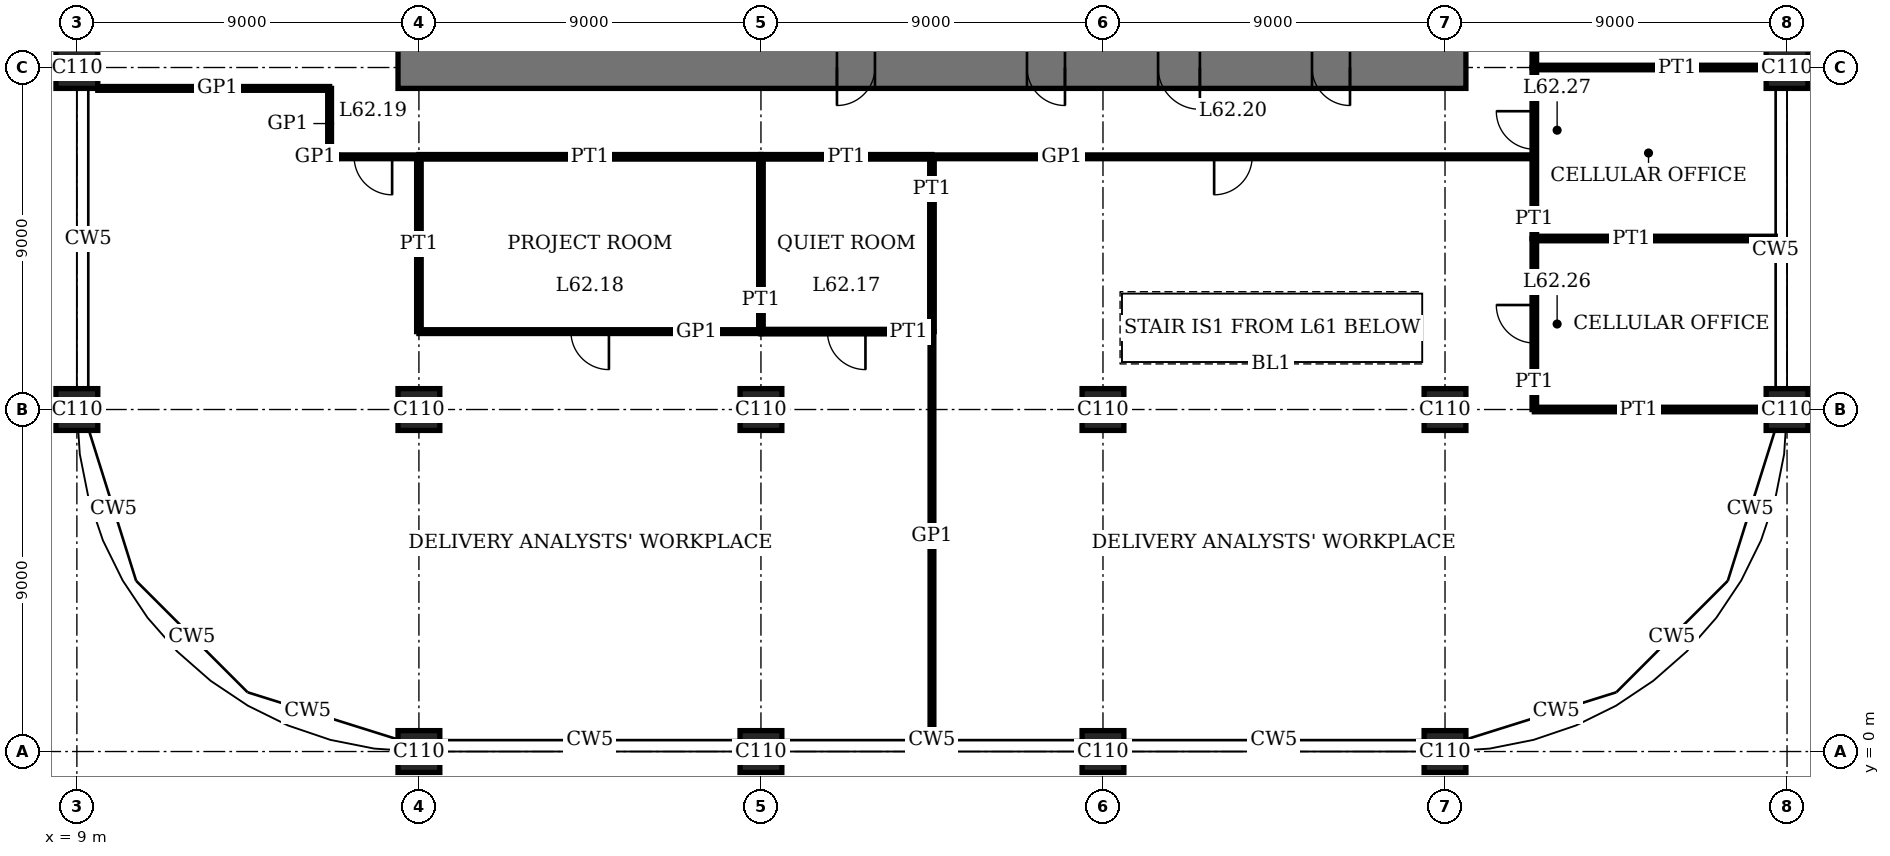
"""IFC4 building model, lengths in metres.
Left out: names, types, materials, properties, quantities, classifications, styles, units other than length and angle.
Written with IfcOpenShell. Run it as: python <this file> out.ifc"""

import sys

from ifc_helpers import new_model, si_unit, direction, frame, frame_2d, origin, origin_2d, place, context, subcontext, project, spatial, rectangle, extrude, element, fill, save


model = new_model("IFC4")
c1 = context("Model", 3, precision=1e-05, world=origin(), true_north=direction((0.0, 1.0)))
c2 = subcontext(c1, "Body", "Model", "MODEL_VIEW")
j1 = project(units=[si_unit("LENGTHUNIT", "METRE"), si_unit("PLANEANGLEUNIT", "RADIAN")], contexts=[c1])
p1 = place(None, origin())
s1 = spatial("IfcSite", under=j1, at=p1, CompositionType="ELEMENT")
p2 = place(p1, origin())
s2 = spatial("IfcBuilding", under=s1, at=p2, CompositionType="ELEMENT")
p3 = place(p2, frame((0.0, 0.0, 255.4)))
s3 = spatial("IfcBuildingStorey", under=s2, at=p3, CompositionType="ELEMENT", Elevation=255.4)
for number, where, z_axis, x_axis in (
    (1, (9.0, 9.0, 0.0), (0.0, 0.0, 1.0), (1.0, 0.0, 0.0)),
    (2, (9.0, 18.0, 0.0), (0.0, 0.0, 1.0), (1.0, 0.0, 0.0)),
    (3, (18.0, 0.0, 0.0), (0.0, 0.0, 1.0), (1.0, 0.0, 0.0)),
    (4, (18.0, 9.0, 0.0), (0.0, 0.0, 1.0), (1.0, 0.0, 0.0)),
    (5, (27.0, 0.0, 0.0), (0.0, 0.0, 1.0), (1.0, 0.0, 0.0)),
    (6, (27.0, 9.0, 0.0), (0.0, 0.0, 1.0), (1.0, 0.0, 0.0)),
    (7, (36.0, 0.0, 0.0), (0.0, 0.0, 1.0), (1.0, 0.0, 0.0)),
    (8, (36.0, 9.0, 0.0), (0.0, 0.0, 1.0), (1.0, 0.0, 0.0)),
    (9, (45.0, 0.0, 0.0), (0.0, 0.0, 1.0), (1.0, 0.0, 0.0)),
    (10, (45.0, 9.0, 0.0), (0.0, 0.0, 1.0), (1.0, 0.0, 0.0)),
    (11, (54.0, 9.0, 0.0), (0.0, 0.0, 1.0), (1.0, 0.0, 0.0)),
    (12, (54.0, 18.0, 0.0), (0.0, 0.0, 1.0), (1.0, 0.0, 0.0)),
):
    element("IfcColumn", number, at=place(p3, frame(where, z_axis=z_axis, x_axis=x_axis)), inside=s3, PredefinedType="COLUMN", context=c2, shape_type="SweptSolid", body=[
        extrude(rectangle(XDim=1.1, YDim=1.1, at=origin_2d()), origin(), (0.0, 0.0, 1.0), 4.0),
    ])
p4 = place(p3, frame((17.45, 18.0, 0.0), z_axis=(0.0, 0.0, 1.0), x_axis=(1.0, 0.0, 0.0)))
e13 = element("IfcWall", 13, at=p4, inside=s3, PredefinedType="SHEAR", context=c2, shape_type="SweptSolid", body=[
    extrude(rectangle(XDim=28.1, YDim=1.1, at=frame_2d((14.05, 0.0))), origin(), (0.0, 0.0, 1.0), 4.0),
])
p5 = place(p4, frame((11.55, 0.0, 0.0)))
e14 = element("IfcOpeningElement", 14, at=p5, cuts=e13, PredefinedType="OPENING", context=c2, shape_type="SweptSolid", body=[
    extrude(rectangle(XDim=1.0, YDim=2.4, at=frame_2d((0.5, 1.2))), frame((0.0, 0.56, 0.0), z_axis=(0.0, -1.0, 0.0), x_axis=(1.0, 0.0, 0.0)), (0.0, 0.0, 1.0), 1.12),
])
p6 = place(p4, frame((16.55, 0.0, 0.0)))
e15 = element("IfcOpeningElement", 15, at=p6, cuts=e13, PredefinedType="OPENING", context=c2, shape_type="SweptSolid", body=[
    extrude(rectangle(XDim=1.0, YDim=2.4, at=frame_2d((0.5, 1.2))), frame((0.0, 0.56, 0.0), z_axis=(0.0, -1.0, 0.0), x_axis=(1.0, 0.0, 0.0)), (0.0, 0.0, 1.0), 1.12),
])
p7 = place(p4, frame((20.0, 0.0, 0.0)))
e16 = element("IfcOpeningElement", 16, at=p7, cuts=e13, PredefinedType="OPENING", context=c2, shape_type="SweptSolid", body=[
    extrude(rectangle(XDim=1.1, YDim=2.4, at=frame_2d((0.55, 1.2))), frame((0.0, 0.56, 0.0), z_axis=(0.0, -1.0, 0.0), x_axis=(1.0, 0.0, 0.0)), (0.0, 0.0, 1.0), 1.12),
])
p8 = place(p4, frame((24.05, 0.0, 0.0)))
e17 = element("IfcOpeningElement", 17, at=p8, cuts=e13, PredefinedType="OPENING", context=c2, shape_type="SweptSolid", body=[
    extrude(rectangle(XDim=1.0, YDim=2.4, at=frame_2d((0.5, 1.2))), frame((0.0, 0.56, 0.0), z_axis=(0.0, -1.0, 0.0), x_axis=(1.0, 0.0, 0.0)), (0.0, 0.0, 1.0), 1.12),
])
p9 = place(p3, frame((47.35, 9.0, 0.0), z_axis=(0.0, 0.0, 1.0), x_axis=(1.0, 0.0, 0.0)))
e18 = element("IfcWall", 18, at=p9, inside=s3, PredefinedType="PARTITIONING", context=c2, shape_type="SweptSolid", body=[
    extrude(rectangle(XDim=6.1, YDim=0.12, at=frame_2d((3.05, 0.0))), origin(), (0.0, 0.0, 1.0), 3.05),
])
p10 = place(p3, frame((27.0, 11.05, 0.0), z_axis=(0.0, 0.0, 1.0), x_axis=(1.0, 0.0, 0.0)))
e19 = element("IfcWall", 19, at=p10, inside=s3, PredefinedType="PARTITIONING", context=c2, shape_type="SweptSolid", body=[
    extrude(rectangle(XDim=4.5, YDim=0.12, at=frame_2d((2.25, 0.0))), origin(), (0.0, 0.0, 1.0), 3.75),
])
p11 = place(p10, frame((1.75, 0.0, 0.0)))
e20 = element("IfcOpeningElement", 20, at=p11, cuts=e19, PredefinedType="OPENING", context=c2, shape_type="SweptSolid", body=[
    extrude(rectangle(XDim=1.0, YDim=2.4, at=frame_2d((0.5, 1.2))), frame((0.0, 0.07, 0.0), z_axis=(0.0, -1.0, 0.0), x_axis=(1.0, 0.0, 0.0)), (0.0, 0.0, 1.0), 0.14),
])
p12 = place(p3, frame((18.0, 11.05, 0.0), z_axis=(0.0, 0.0, 1.0), x_axis=(1.0, 0.0, 0.0)))
e21 = element("IfcWall", 21, at=p12, inside=s3, PredefinedType="PARTITIONING", context=c2, shape_type="SweptSolid", body=[
    extrude(rectangle(XDim=9.0, YDim=0.1, at=frame_2d((4.5, 0.0))), origin(), (0.0, 0.0, 1.0), 3.75),
])
p13 = place(p12, frame((4.0, 0.0, 0.0)))
e22 = element("IfcOpeningElement", 22, at=p13, cuts=e21, PredefinedType="OPENING", context=c2, shape_type="SweptSolid", body=[
    extrude(rectangle(XDim=1.0, YDim=2.4, at=frame_2d((0.5, 1.2))), frame((0.0, 0.06, 0.0), z_axis=(0.0, -1.0, 0.0), x_axis=(1.0, 0.0, 0.0)), (0.0, 0.0, 1.0), 0.12),
])
p14 = place(p3, frame((47.35, 13.5, 0.0), z_axis=(0.0, 0.0, 1.0), x_axis=(1.0, 0.0, 0.0)))
e23 = element("IfcWall", 23, at=p14, inside=s3, PredefinedType="PARTITIONING", context=c2, shape_type="SweptSolid", body=[
    extrude(rectangle(XDim=6.34, YDim=0.12, at=frame_2d((3.17, 0.0))), origin(), (0.0, 0.0, 1.0), 3.1),
])
p15 = place(p3, frame((18.0, 15.65, 0.0), z_axis=(0.0, 0.0, 1.0), x_axis=(1.0, 0.0, 0.0)))
e24 = element("IfcWall", 24, at=p15, inside=s3, PredefinedType="PARTITIONING", context=c2, shape_type="SweptSolid", body=[
    extrude(rectangle(XDim=9.0, YDim=0.12, at=frame_2d((4.5, 0.0))), origin(), (0.0, 0.0, 1.0), 3.75),
])
p16 = place(p3, frame((27.0, 15.65, 0.0), z_axis=(0.0, 0.0, 1.0), x_axis=(1.0, 0.0, 0.0)))
e25 = element("IfcWall", 25, at=p16, inside=s3, PredefinedType="PARTITIONING", context=c2, shape_type="SweptSolid", body=[
    extrude(rectangle(XDim=4.5, YDim=0.12, at=frame_2d((2.25, 0.0))), origin(), (0.0, 0.0, 1.0), 3.75),
])
p17 = place(p3, frame((15.6, 15.65, 0.0), z_axis=(0.0, 0.0, 1.0), x_axis=(1.0, 0.0, 0.0)))
e26 = element("IfcWall", 26, at=p17, inside=s3, PredefinedType="PARTITIONING", context=c2, shape_type="SweptSolid", body=[
    extrude(rectangle(XDim=2.39, YDim=0.1, at=frame_2d((1.195, 0.0))), origin(), (0.0, 0.0, 1.0), 3.75),
])
p18 = place(p17, frame((0.695, 0.0, 0.0)))
e27 = element("IfcOpeningElement", 27, at=p18, cuts=e26, PredefinedType="OPENING", context=c2, shape_type="SweptSolid", body=[
    extrude(rectangle(XDim=1.0, YDim=2.4, at=frame_2d((0.5, 1.2))), frame((0.0, 0.06, 0.0), z_axis=(0.0, -1.0, 0.0), x_axis=(1.0, 0.0, 0.0)), (0.0, 0.0, 1.0), 0.12),
])
p19 = place(p3, frame((31.51, 15.65, 0.0), z_axis=(0.0, 0.0, 1.0), x_axis=(1.0, 0.0, 0.0)))
e28 = element("IfcWall", 28, at=p19, inside=s3, PredefinedType="PARTITIONING", context=c2, shape_type="SweptSolid", body=[
    extrude(rectangle(XDim=15.83, YDim=0.1, at=frame_2d((7.915, 0.0))), origin(), (0.0, 0.0, 1.0), 3.75),
])
p20 = place(p19, frame((7.415, 0.0, 0.0)))
e29 = element("IfcOpeningElement", 29, at=p20, cuts=e28, PredefinedType="OPENING", context=c2, shape_type="SweptSolid", body=[
    extrude(rectangle(XDim=1.0, YDim=2.4, at=frame_2d((0.5, 1.2))), frame((0.0, 0.06, 0.0), z_axis=(0.0, -1.0, 0.0), x_axis=(1.0, 0.0, 0.0)), (0.0, 0.0, 1.0), 0.12),
])
p21 = place(p3, frame((9.55, 17.45, 0.0), z_axis=(0.0, 0.0, 1.0), x_axis=(1.0, 0.0, 0.0)))
e30 = element("IfcWall", 30, at=p21, inside=s3, PredefinedType="PARTITIONING", context=c2, shape_type="SweptSolid", body=[
    extrude(rectangle(XDim=6.1, YDim=0.1, at=frame_2d((3.05, 0.0))), origin(), (0.0, 0.0, 1.0), 3.75),
])
p22 = place(p3, frame((47.35, 18.0, 0.0), z_axis=(0.0, 0.0, 1.0), x_axis=(1.0, 0.0, 0.0)))
e31 = element("IfcWall", 31, at=p22, inside=s3, PredefinedType="PARTITIONING", context=c2, shape_type="SweptSolid", body=[
    extrude(rectangle(XDim=6.1, YDim=0.12, at=frame_2d((3.05, 0.0))), origin(), (0.0, 0.0, 1.0), 3.05),
])
p23 = place(p3, frame((15.65, 15.6, 0.0), z_axis=(0.0, 0.0, 1.0), x_axis=(0.0, 1.0, 0.0)))
e32 = element("IfcWall", 32, at=p23, inside=s3, PredefinedType="PARTITIONING", context=c2, shape_type="SweptSolid", body=[
    extrude(rectangle(XDim=1.85, YDim=0.1, at=frame_2d((0.925, 0.0))), origin(), (0.0, 0.0, 1.0), 3.75),
])
for number, where, z_axis, x_axis in (
    (33, (18.0, 11.05, 0.0), (0.0, 0.0, 1.0), (0.0, 1.0, 0.0)),
    (34, (27.0, 11.05, 0.0), (0.0, 0.0, 1.0), (0.0, 1.0, 0.0)),
):
    element("IfcWall", number, at=place(p3, frame(where, z_axis=z_axis, x_axis=x_axis)), inside=s3, PredefinedType="PARTITIONING", context=c2, shape_type="SweptSolid", body=[
        extrude(rectangle(XDim=4.6, YDim=0.12, at=frame_2d((2.3, 0.0))), origin(), (0.0, 0.0, 1.0), 3.05),
    ])
p24 = place(p3, frame((31.5, 11.05, 0.0), z_axis=(0.0, 0.0, 1.0), x_axis=(0.0, 1.0, 0.0)))
e35 = element("IfcWall", 35, at=p24, inside=s3, PredefinedType="PARTITIONING", context=c2, shape_type="SweptSolid", body=[
    extrude(rectangle(XDim=4.6, YDim=0.12, at=frame_2d((2.3, 0.0))), origin(), (0.0, 0.0, 1.0), 3.75),
])
p25 = place(p3, frame((31.5, 0.31, 0.0), z_axis=(0.0, 0.0, 1.0), x_axis=(0.0, 1.0, 0.0)))
e36 = element("IfcWall", 36, at=p25, inside=s3, PredefinedType="PARTITIONING", context=c2, shape_type="SweptSolid", body=[
    extrude(rectangle(XDim=10.74, YDim=0.1, at=frame_2d((5.37, 0.0))), origin(), (0.0, 0.0, 1.0), 3.75),
])
p26 = place(p3, frame((47.35, 9.0, 0.0), z_axis=(0.0, 0.0, 1.0), x_axis=(0.0, 1.0, 0.0)))
e37 = element("IfcWall", 37, at=p26, inside=s3, PredefinedType="PARTITIONING", context=c2, shape_type="SweptSolid", body=[
    extrude(rectangle(XDim=4.5, YDim=0.12, at=frame_2d((2.25, 0.0))), origin(), (0.0, 0.0, 1.0), 3.75),
])
p27 = place(p26, frame((1.75, 0.0, 0.0)))
e38 = element("IfcOpeningElement", 38, at=p27, cuts=e37, PredefinedType="OPENING", context=c2, shape_type="SweptSolid", body=[
    extrude(rectangle(XDim=1.0, YDim=2.4, at=frame_2d((0.5, 1.2))), frame((0.0, 0.07, 0.0), z_axis=(0.0, -1.0, 0.0), x_axis=(1.0, 0.0, 0.0)), (0.0, 0.0, 1.0), 0.14),
])
p28 = place(p3, frame((47.35, 13.5, 0.0), z_axis=(0.0, 0.0, 1.0), x_axis=(0.0, 1.0, 0.0)))
e39 = element("IfcWall", 39, at=p28, inside=s3, PredefinedType="PARTITIONING", context=c2, shape_type="SweptSolid", body=[
    extrude(rectangle(XDim=4.5, YDim=0.12, at=frame_2d((2.25, 0.0))), origin(), (0.0, 0.0, 1.0), 3.75),
])
p29 = place(p28, frame((2.35, 0.0, 0.0)))
e40 = element("IfcOpeningElement", 40, at=p29, cuts=e39, PredefinedType="OPENING", context=c2, shape_type="SweptSolid", body=[
    extrude(rectangle(XDim=1.0, YDim=2.4, at=frame_2d((0.5, 1.2))), frame((0.0, 0.07, 0.0), z_axis=(0.0, -1.0, 0.0), x_axis=(1.0, 0.0, 0.0)), (0.0, 0.0, 1.0), 0.14),
])
p30 = place(p3, frame((47.35, 18.0, 0.0), z_axis=(0.0, 0.0, 1.0), x_axis=(0.0, 1.0, 0.0)))
e41 = element("IfcWall", 41, at=p30, inside=s3, PredefinedType="PARTITIONING", context=c2, shape_type="SweptSolid", body=[
    extrude(rectangle(XDim=4.5, YDim=0.12, at=frame_2d((2.25, 0.0))), origin(), (0.0, 0.0, 1.0), 3.75),
])
p31 = place(p30, frame((1.75, 0.0, 0.0)))
e42 = element("IfcOpeningElement", 42, at=p31, cuts=e41, PredefinedType="OPENING", context=c2, shape_type="SweptSolid", body=[
    extrude(rectangle(XDim=1.0, YDim=2.4, at=frame_2d((0.5, 1.2))), frame((0.0, 0.07, 0.0), z_axis=(0.0, -1.0, 0.0), x_axis=(1.0, 0.0, 0.0)), (0.0, 0.0, 1.0), 0.14),
])
p32 = place(p5, origin())
e43 = element("IfcDoor", 43, at=p32, inside=s3, OperationType="SINGLE_SWING_LEFT", PredefinedType="DOOR", context=c2, shape_type="SweptSolid", body=[
    extrude(rectangle(XDim=1.0, YDim=2.4, at=frame_2d((0.5, 1.2))), frame((0.0, 0.025, 0.0), z_axis=(0.0, -1.0, 0.0), x_axis=(1.0, 0.0, 0.0)), (0.0, 0.0, 1.0), 0.05),
    extrude(rectangle(XDim=0.04, YDim=2.4, at=frame_2d((0.02, 1.2))), frame((0.0, 0.4, 0.0), z_axis=(0.0, -1.0, 0.0), x_axis=(1.0, 0.0, 0.0)), (0.0, 0.0, 1.0), 0.8),
    extrude(rectangle(XDim=0.04, YDim=2.4, at=frame_2d((0.98, 1.2))), frame((0.0, 0.4, 0.0), z_axis=(0.0, -1.0, 0.0), x_axis=(1.0, 0.0, 0.0)), (0.0, 0.0, 1.0), 0.8),
    extrude(rectangle(XDim=1.0, YDim=0.04, at=frame_2d((0.5, 2.38))), frame((0.0, 0.4, 0.0), z_axis=(0.0, -1.0, 0.0), x_axis=(1.0, 0.0, 0.0)), (0.0, 0.0, 1.0), 0.8),
])
fill(e14, e43)
p33 = place(p6, origin())
e44 = element("IfcDoor", 44, at=p33, inside=s3, OperationType="SINGLE_SWING_RIGHT", PredefinedType="DOOR", context=c2, shape_type="SweptSolid", body=[
    extrude(rectangle(XDim=1.0, YDim=2.4, at=frame_2d((0.5, 1.2))), frame((0.0, 0.025, 0.0), z_axis=(0.0, -1.0, 0.0), x_axis=(1.0, 0.0, 0.0)), (0.0, 0.0, 1.0), 0.05),
    extrude(rectangle(XDim=0.04, YDim=2.4, at=frame_2d((0.02, 1.2))), frame((0.0, 0.4, 0.0), z_axis=(0.0, -1.0, 0.0), x_axis=(1.0, 0.0, 0.0)), (0.0, 0.0, 1.0), 0.8),
    extrude(rectangle(XDim=0.04, YDim=2.4, at=frame_2d((0.98, 1.2))), frame((0.0, 0.4, 0.0), z_axis=(0.0, -1.0, 0.0), x_axis=(1.0, 0.0, 0.0)), (0.0, 0.0, 1.0), 0.8),
    extrude(rectangle(XDim=1.0, YDim=0.04, at=frame_2d((0.5, 2.38))), frame((0.0, 0.4, 0.0), z_axis=(0.0, -1.0, 0.0), x_axis=(1.0, 0.0, 0.0)), (0.0, 0.0, 1.0), 0.8),
])
fill(e15, e44)
p34 = place(p7, origin())
e45 = element("IfcDoor", 45, at=p34, inside=s3, OperationType="SINGLE_SWING_RIGHT", PredefinedType="DOOR", context=c2, shape_type="SweptSolid", body=[
    extrude(rectangle(XDim=1.1, YDim=2.4, at=frame_2d((0.55, 1.2))), frame((0.0, 0.025, 0.0), z_axis=(0.0, -1.0, 0.0), x_axis=(1.0, 0.0, 0.0)), (0.0, 0.0, 1.0), 0.05),
    extrude(rectangle(XDim=0.04, YDim=2.4, at=frame_2d((0.02, 1.2))), frame((0.0, 0.44, 0.0), z_axis=(0.0, -1.0, 0.0), x_axis=(1.0, 0.0, 0.0)), (0.0, 0.0, 1.0), 0.88),
    extrude(rectangle(XDim=0.04, YDim=2.4, at=frame_2d((1.08, 1.2))), frame((0.0, 0.44, 0.0), z_axis=(0.0, -1.0, 0.0), x_axis=(1.0, 0.0, 0.0)), (0.0, 0.0, 1.0), 0.88),
    extrude(rectangle(XDim=1.1, YDim=0.04, at=frame_2d((0.55, 2.38))), frame((0.0, 0.44, 0.0), z_axis=(0.0, -1.0, 0.0), x_axis=(1.0, 0.0, 0.0)), (0.0, 0.0, 1.0), 0.88),
])
fill(e16, e45)
p35 = place(p8, origin())
e46 = element("IfcDoor", 46, at=p35, inside=s3, OperationType="SINGLE_SWING_RIGHT", PredefinedType="DOOR", context=c2, shape_type="SweptSolid", body=[
    extrude(rectangle(XDim=1.0, YDim=2.4, at=frame_2d((0.5, 1.2))), frame((0.0, 0.025, 0.0), z_axis=(0.0, -1.0, 0.0), x_axis=(1.0, 0.0, 0.0)), (0.0, 0.0, 1.0), 0.05),
    extrude(rectangle(XDim=0.04, YDim=2.4, at=frame_2d((0.02, 1.2))), frame((0.0, 0.4, 0.0), z_axis=(0.0, -1.0, 0.0), x_axis=(1.0, 0.0, 0.0)), (0.0, 0.0, 1.0), 0.8),
    extrude(rectangle(XDim=0.04, YDim=2.4, at=frame_2d((0.98, 1.2))), frame((0.0, 0.4, 0.0), z_axis=(0.0, -1.0, 0.0), x_axis=(1.0, 0.0, 0.0)), (0.0, 0.0, 1.0), 0.8),
    extrude(rectangle(XDim=1.0, YDim=0.04, at=frame_2d((0.5, 2.38))), frame((0.0, 0.4, 0.0), z_axis=(0.0, -1.0, 0.0), x_axis=(1.0, 0.0, 0.0)), (0.0, 0.0, 1.0), 0.8),
])
fill(e17, e46)
p36 = place(p11, origin())
e47 = element("IfcDoor", 47, at=p36, inside=s3, OperationType="SINGLE_SWING_RIGHT", PredefinedType="DOOR", context=c2, shape_type="SweptSolid", body=[
    extrude(rectangle(XDim=1.0, YDim=2.4, at=frame_2d((0.5, 1.2))), frame((0.0, 0.025, 0.0), z_axis=(0.0, -1.0, 0.0), x_axis=(1.0, 0.0, 0.0)), (0.0, 0.0, 1.0), 0.05),
])
fill(e20, e47)
p37 = place(p13, origin())
e48 = element("IfcDoor", 48, at=p37, inside=s3, OperationType="SINGLE_SWING_RIGHT", PredefinedType="DOOR", context=c2, shape_type="SweptSolid", body=[
    extrude(rectangle(XDim=1.0, YDim=2.4, at=frame_2d((0.5, 1.2))), frame((0.0, 0.02, 0.0), z_axis=(0.0, -1.0, 0.0), x_axis=(1.0, 0.0, 0.0)), (0.0, 0.0, 1.0), 0.04),
])
fill(e22, e48)
p38 = place(p18, origin())
e49 = element("IfcDoor", 49, at=p38, inside=s3, OperationType="SINGLE_SWING_RIGHT", PredefinedType="DOOR", context=c2, shape_type="SweptSolid", body=[
    extrude(rectangle(XDim=1.0, YDim=2.4, at=frame_2d((0.5, 1.2))), frame((0.0, 0.02, 0.0), z_axis=(0.0, -1.0, 0.0), x_axis=(1.0, 0.0, 0.0)), (0.0, 0.0, 1.0), 0.04),
])
fill(e27, e49)
p39 = place(p20, origin())
e50 = element("IfcDoor", 50, at=p39, inside=s3, OperationType="SINGLE_SWING_LEFT", PredefinedType="DOOR", context=c2, shape_type="SweptSolid", body=[
    extrude(rectangle(XDim=1.0, YDim=2.4, at=frame_2d((0.5, 1.2))), frame((0.0, 0.02, 0.0), z_axis=(0.0, -1.0, 0.0), x_axis=(1.0, 0.0, 0.0)), (0.0, 0.0, 1.0), 0.04),
])
fill(e29, e50)
p40 = place(p27, origin())
e51 = element("IfcDoor", 51, at=p40, inside=s3, OperationType="SINGLE_SWING_LEFT", PredefinedType="DOOR", context=c2, shape_type="SweptSolid", body=[
    extrude(rectangle(XDim=1.0, YDim=2.4, at=frame_2d((0.5, 1.2))), frame((0.0, 0.025, 0.0), z_axis=(0.0, -1.0, 0.0), x_axis=(1.0, 0.0, 0.0)), (0.0, 0.0, 1.0), 0.05),
])
fill(e38, e51)
p41 = place(p29, origin())
e52 = element("IfcDoor", 52, at=p41, inside=s3, OperationType="SINGLE_SWING_LEFT", PredefinedType="DOOR", context=c2, shape_type="SweptSolid", body=[
    extrude(rectangle(XDim=1.0, YDim=2.4, at=frame_2d((0.5, 1.2))), frame((0.0, 0.025, 0.0), z_axis=(0.0, -1.0, 0.0), x_axis=(1.0, 0.0, 0.0)), (0.0, 0.0, 1.0), 0.05),
])
fill(e40, e52)
save(model, sys.argv[1])
